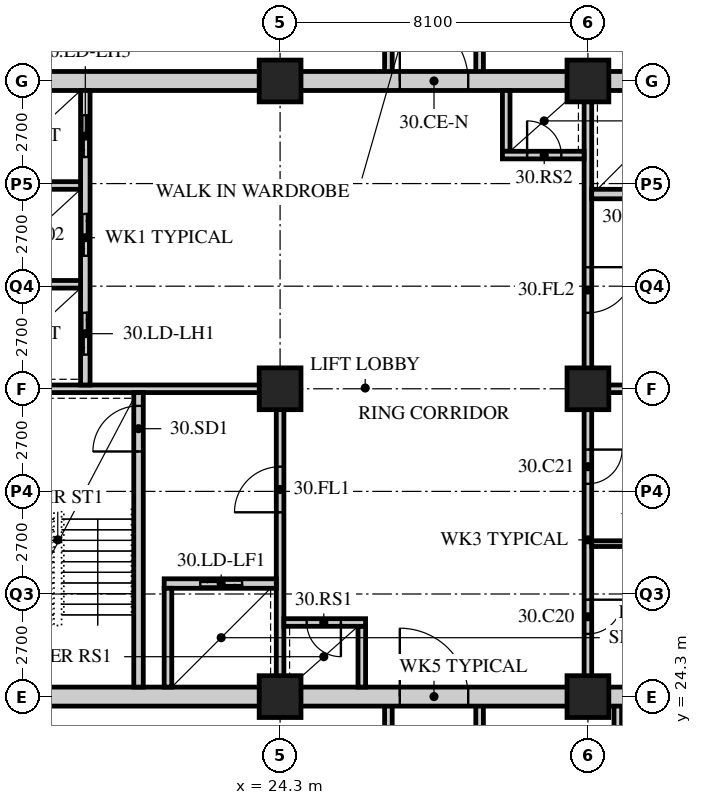
"""IFC4 building model, lengths in metres.
Left out: names, types, materials, properties, quantities, classifications, styles, units other than length and angle.
Written with IfcOpenShell. Run it as: python <this file> out.ifc"""

import sys

from ifc_helpers import new_model, si_unit, direction, frame, frame_2d, origin, origin_2d, place, context, subcontext, project, spatial, rectangle, hollow_rectangle, extrude, element, fill, save


model = new_model("IFC4")
c1 = context("Model", 3, precision=1e-05, world=origin(), true_north=direction((0.0, 1.0)))
c2 = subcontext(c1, "Body", "Model", "MODEL_VIEW")
j1 = project(units=[si_unit("LENGTHUNIT", "METRE"), si_unit("PLANEANGLEUNIT", "RADIAN")], contexts=[c1])
p1 = place(None, origin())
s1 = spatial("IfcSite", under=j1, at=p1, CompositionType="ELEMENT")
p2 = place(p1, origin())
s2 = spatial("IfcBuilding", under=s1, at=p2, CompositionType="ELEMENT")
p3 = place(p2, frame((0.0, 0.0, 120.4)))
s3 = spatial("IfcBuildingStorey", under=s2, at=p3, CompositionType="ELEMENT", Elevation=120.4)
for number, where, z_axis, x_axis in (
    (1, (24.3, 24.3, 0.0), (0.0, 0.0, 1.0), (1.0, 0.0, 0.0)),
    (2, (24.3, 32.4, 0.0), (0.0, 0.0, 1.0), (1.0, 0.0, 0.0)),
    (3, (24.3, 40.5, 0.0), (0.0, 0.0, 1.0), (1.0, 0.0, 0.0)),
    (4, (32.4, 24.3, 0.0), (0.0, 0.0, 1.0), (1.0, 0.0, 0.0)),
    (5, (32.4, 32.4, 0.0), (0.0, 0.0, 1.0), (1.0, 0.0, 0.0)),
    (6, (32.4, 40.5, 0.0), (0.0, 0.0, 1.0), (1.0, 0.0, 0.0)),
):
    element("IfcColumn", number, at=place(p3, frame(where, z_axis=z_axis, x_axis=x_axis)), inside=s3, PredefinedType="COLUMN", context=c2, shape_type="SweptSolid", body=[
        extrude(hollow_rectangle(XDim=1.1, YDim=1.1, WallThickness=0.1, at=origin_2d()), origin(), (0.0, 0.0, 1.0), 3.4),
    ])
for number, where, z_axis, x_axis in (
    (7, (33.186, 19.35, 0.0), (0.0, 0.0, 1.0), (0.0, 1.0, 0.0)),
    (8, (27.15, 19.35, 0.0), (0.0, 0.0, 1.0), (0.0, 1.0, 0.0)),
    (9, (29.55, 19.35, 0.0), (0.0, 0.0, 1.0), (0.0, 1.0, 0.0)),
):
    element("IfcWall", number, at=place(p3, frame(where, z_axis=z_axis, x_axis=x_axis)), inside=s3, PredefinedType="SOLIDWALL", context=c2, shape_type="SweptSolid", body=[
        extrude(rectangle(XDim=4.95, YDim=0.2, at=frame_2d((2.475, 0.0))), origin(), (0.0, 0.0, 1.0), 3.19),
    ])
for number, where, z_axis, x_axis in (
    (10, (27.15, 40.5, 0.0), (0.0, 0.0, 1.0), (0.0, 1.0, 0.0)),
    (11, (29.55, 40.5, 0.0), (0.0, 0.0, 1.0), (0.0, 1.0, 0.0)),
):
    element("IfcWall", number, at=place(p3, frame(where, z_axis=z_axis, x_axis=x_axis)), inside=s3, PredefinedType="SOLIDWALL", context=c2, shape_type="SweptSolid", body=[
        extrude(rectangle(XDim=3.6, YDim=0.2, at=frame_2d((1.8, 0.0))), origin(), (0.0, 0.0, 1.0), 3.19),
    ])
p4 = place(p3, frame((15.95, 24.3, 0.0), z_axis=(0.0, 0.0, 1.0), x_axis=(1.0, 0.0, 0.0)))
e12 = element("IfcWall", 12, at=p4, inside=s3, PredefinedType="SOLIDWALL", context=c2, shape_type="SweptSolid", body=[
    extrude(rectangle(XDim=24.8, YDim=0.5, at=frame_2d((12.4, 0.0))), origin(), (0.0, 0.0, 1.0), 2.54),
])
p5 = place(p4, frame((11.5, 0.0, 0.0)))
e13 = element("IfcOpeningElement", 13, at=p5, cuts=e12, PredefinedType="OPENING", context=c2, shape_type="SweptSolid", body=[
    extrude(rectangle(XDim=1.8, YDim=2.4, at=frame_2d((0.9, 1.2))), frame((0.0, 0.26, 0.0), z_axis=(0.0, -1.0, 0.0), x_axis=(1.0, 0.0, 0.0)), (0.0, 0.0, 1.0), 0.52),
])
p6 = place(p3, frame((15.95, 40.5, 0.0), z_axis=(0.0, 0.0, 1.0), x_axis=(1.0, 0.0, 0.0)))
e14 = element("IfcWall", 14, at=p6, inside=s3, PredefinedType="SOLIDWALL", context=c2, shape_type="SweptSolid", body=[
    extrude(rectangle(XDim=24.8, YDim=0.5, at=frame_2d((12.4, 0.0))), origin(), (0.0, 0.0, 1.0), 2.54),
])
p7 = place(p6, frame((11.5, 0.0, 0.0)))
e15 = element("IfcOpeningElement", 15, at=p7, cuts=e14, PredefinedType="OPENING", context=c2, shape_type="SweptSolid", body=[
    extrude(rectangle(XDim=1.8, YDim=2.4, at=frame_2d((0.9, 1.2))), frame((0.0, 0.26, 0.0), z_axis=(0.0, -1.0, 0.0), x_axis=(1.0, 0.0, 0.0)), (0.0, 0.0, 1.0), 0.52),
])
p8 = place(p3, frame((16.45, 32.4, 0.0), z_axis=(0.0, 0.0, 1.0), x_axis=(1.0, 0.0, 0.0)))
e16 = element("IfcWall", 16, at=p8, inside=s3, PredefinedType="SOLIDWALL", context=c2, shape_type="SweptSolid", body=[
    extrude(rectangle(XDim=7.95, YDim=0.2, at=frame_2d((3.975, 0.0))), origin(), (0.0, 0.0, 1.0), 2.578),
])
p9 = place(p3, frame((24.3, 24.55, 0.0), z_axis=(0.0, 0.0, 1.0), x_axis=(0.0, 1.0, 0.0)))
e17 = element("IfcWall", 17, at=p9, inside=s3, PredefinedType="SOLIDWALL", context=c2, shape_type="SweptSolid", body=[
    extrude(rectangle(XDim=7.75, YDim=0.2, at=frame_2d((3.875, 0.0))), origin(), (0.0, 0.0, 1.0), 2.578),
])
p10 = place(p9, frame((4.6, 0.0, 0.0)))
e18 = element("IfcOpeningElement", 18, at=p10, cuts=e17, PredefinedType="OPENING", context=c2, shape_type="SweptSolid", body=[
    extrude(rectangle(XDim=1.2, YDim=2.1, at=frame_2d((0.6, 1.05))), frame((0.0, 0.11, 0.0), z_axis=(0.0, -1.0, 0.0), x_axis=(1.0, 0.0, 0.0)), (0.0, 0.0, 1.0), 0.22),
])
p11 = place(p3, frame((20.575, 24.55, 0.0), z_axis=(0.0, 0.0, 1.0), x_axis=(0.0, 1.0, 0.0)))
e19 = element("IfcWall", 19, at=p11, inside=s3, PredefinedType="SOLIDWALL", context=c2, shape_type="SweptSolid", body=[
    extrude(rectangle(XDim=7.75, YDim=0.25, at=frame_2d((3.875, 0.0))), origin(), (0.0, 0.0, 1.0), 3.19),
])
p12 = place(p11, frame((6.2, 0.0, 0.0)))
e20 = element("IfcOpeningElement", 20, at=p12, cuts=e19, PredefinedType="OPENING", context=c2, shape_type="SweptSolid", body=[
    extrude(rectangle(XDim=1.2, YDim=2.1, at=frame_2d((0.6, 1.05))), frame((0.0, 0.135, 0.0), z_axis=(0.0, -1.0, 0.0), x_axis=(1.0, 0.0, 0.0)), (0.0, 0.0, 1.0), 0.27),
])
p13 = place(p3, frame((21.25, 27.275, 0.0), z_axis=(0.0, 0.0, 1.0), x_axis=(1.0, 0.0, 0.0)))
e21 = element("IfcWall", 21, at=p13, inside=s3, PredefinedType="SOLIDWALL", context=c2, shape_type="SweptSolid", body=[
    extrude(rectangle(XDim=2.95, YDim=0.25, at=frame_2d((1.475, 0.0))), origin(), (0.0, 0.0, 1.0), 3.19),
])
p14 = place(p13, frame((0.95, 0.0, 0.0)))
e22 = element("IfcOpeningElement", 22, at=p14, cuts=e21, PredefinedType="OPENING", context=c2, shape_type="SweptSolid", body=[
    extrude(rectangle(XDim=1.1, YDim=2.4, at=frame_2d((0.55, 1.2))), frame((0.0, 0.135, 0.0), z_axis=(0.0, -1.0, 0.0), x_axis=(1.0, 0.0, 0.0)), (0.0, 0.0, 1.0), 0.27),
])
p15 = place(p3, frame((21.35, 24.55, 0.0), z_axis=(0.0, 0.0, 1.0), x_axis=(0.0, 1.0, 0.0)))
e23 = element("IfcWall", 23, at=p15, inside=s3, PredefinedType="SOLIDWALL", context=c2, shape_type="SweptSolid", body=[
    extrude(rectangle(XDim=2.6, YDim=0.2, at=frame_2d((1.3, 0.0))), origin(), (0.0, 0.0, 1.0), 3.19),
])
p16 = place(p3, frame((19.175, 32.5, 0.0), z_axis=(0.0, 0.0, 1.0), x_axis=(0.0, 1.0, 0.0)))
e24 = element("IfcWall", 24, at=p16, inside=s3, PredefinedType="SOLIDWALL", context=c2, shape_type="SweptSolid", body=[
    extrude(rectangle(XDim=7.75, YDim=0.25, at=frame_2d((3.875, 0.0))), origin(), (0.0, 0.0, 1.0), 3.19),
])
p17 = place(p16, frame((0.8, 0.0, 0.0)))
e25 = element("IfcOpeningElement", 25, at=p17, cuts=e24, PredefinedType="OPENING", context=c2, shape_type="SweptSolid", body=[
    extrude(rectangle(XDim=1.1, YDim=2.4, at=frame_2d((0.55, 1.2))), frame((0.0, 0.135, 0.0), z_axis=(0.0, -1.0, 0.0), x_axis=(1.0, 0.0, 0.0)), (0.0, 0.0, 1.0), 0.27),
])
p18 = place(p16, frame((3.4, 0.0, 0.0)))
e26 = element("IfcOpeningElement", 26, at=p18, cuts=e24, PredefinedType="OPENING", context=c2, shape_type="SweptSolid", body=[
    extrude(rectangle(XDim=1.1, YDim=2.4, at=frame_2d((0.55, 1.2))), frame((0.0, 0.135, 0.0), z_axis=(0.0, -1.0, 0.0), x_axis=(1.0, 0.0, 0.0)), (0.0, 0.0, 1.0), 0.27),
])
p19 = place(p16, frame((6.0, 0.0, 0.0)))
e27 = element("IfcOpeningElement", 27, at=p19, cuts=e24, PredefinedType="OPENING", context=c2, shape_type="SweptSolid", body=[
    extrude(rectangle(XDim=1.1, YDim=2.4, at=frame_2d((0.55, 1.2))), frame((0.0, 0.135, 0.0), z_axis=(0.0, -1.0, 0.0), x_axis=(1.0, 0.0, 0.0)), (0.0, 0.0, 1.0), 0.27),
])
for number, where, z_axis, x_axis in (
    (28, (16.45, 35.15, 0.0), (0.0, 0.0, 1.0), (1.0, 0.0, 0.0)),
    (29, (16.45, 37.75, 0.0), (0.0, 0.0, 1.0), (1.0, 0.0, 0.0)),
):
    element("IfcWall", number, at=place(p3, frame(where, z_axis=z_axis, x_axis=x_axis)), inside=s3, PredefinedType="SOLIDWALL", context=c2, shape_type="SweptSolid", body=[
        extrude(rectangle(XDim=2.6, YDim=0.2, at=frame_2d((1.3, 0.0))), origin(), (0.0, 0.0, 1.0), 3.19),
    ])
p20 = place(p3, frame((26.45, 24.55, 0.0), z_axis=(0.0, 0.0, 1.0), x_axis=(0.0, 1.0, 0.0)))
e30 = element("IfcWall", 30, at=p20, inside=s3, PredefinedType="SOLIDWALL", context=c2, shape_type="SweptSolid", body=[
    extrude(rectangle(XDim=1.6, YDim=0.2, at=frame_2d((0.8, 0.0))), origin(), (0.0, 0.0, 1.0), 3.19),
])
p21 = place(p3, frame((24.4, 26.25, 0.0), z_axis=(0.0, 0.0, 1.0), x_axis=(1.0, 0.0, 0.0)))
e31 = element("IfcWall", 31, at=p21, inside=s3, PredefinedType="SOLIDWALL", context=c2, shape_type="SweptSolid", body=[
    extrude(rectangle(XDim=2.15, YDim=0.2, at=frame_2d((1.075, 0.0))), origin(), (0.0, 0.0, 1.0), 3.19),
])
p22 = place(p21, frame((0.6, 0.0, 0.0)))
e32 = element("IfcOpeningElement", 32, at=p22, cuts=e31, PredefinedType="OPENING", context=c2, shape_type="SweptSolid", body=[
    extrude(rectangle(XDim=0.9, YDim=2.1, at=frame_2d((0.45, 1.05))), frame((0.0, 0.11, 0.0), z_axis=(0.0, -1.0, 0.0), x_axis=(1.0, 0.0, 0.0)), (0.0, 0.0, 1.0), 0.22),
])
p23 = place(p3, frame((32.3, 32.4, 0.0), z_axis=(0.0, 0.0, 1.0), x_axis=(1.0, 0.0, 0.0)))
e33 = element("IfcWall", 33, at=p23, inside=s3, PredefinedType="SOLIDWALL", context=c2, shape_type="SweptSolid", body=[
    extrude(rectangle(XDim=7.95, YDim=0.2, at=frame_2d((3.975, 0.0))), origin(), (0.0, 0.0, 1.0), 2.578),
])
p24 = place(p3, frame((32.4, 32.5, 0.0), z_axis=(0.0, 0.0, 1.0), x_axis=(0.0, 1.0, 0.0)))
e34 = element("IfcWall", 34, at=p24, inside=s3, PredefinedType="SOLIDWALL", context=c2, shape_type="SweptSolid", body=[
    extrude(rectangle(XDim=7.75, YDim=0.2, at=frame_2d((3.875, 0.0))), origin(), (0.0, 0.0, 1.0), 2.578),
])
p25 = place(p24, frame((1.9, 0.0, 0.0)))
e35 = element("IfcOpeningElement", 35, at=p25, cuts=e34, PredefinedType="OPENING", context=c2, shape_type="SweptSolid", body=[
    extrude(rectangle(XDim=1.2, YDim=2.1, at=frame_2d((0.6, 1.05))), frame((0.0, 0.11, 0.0), z_axis=(0.0, -1.0, 0.0), x_axis=(1.0, 0.0, 0.0)), (0.0, 0.0, 1.0), 0.22),
])
p26 = place(p3, frame((32.5, 37.525, 0.0), z_axis=(0.0, 0.0, 1.0), x_axis=(1.0, 0.0, 0.0)))
e36 = element("IfcWall", 36, at=p26, inside=s3, PredefinedType="SOLIDWALL", context=c2, shape_type="SweptSolid", body=[
    extrude(rectangle(XDim=2.95, YDim=0.25, at=frame_2d((1.475, 0.0))), origin(), (0.0, 0.0, 1.0), 3.19),
])
p27 = place(p26, frame((0.9, 0.0, 0.0)))
e37 = element("IfcOpeningElement", 37, at=p27, cuts=e36, PredefinedType="OPENING", context=c2, shape_type="SweptSolid", body=[
    extrude(rectangle(XDim=1.1, YDim=2.4, at=frame_2d((0.55, 1.2))), frame((0.0, 0.135, 0.0), z_axis=(0.0, -1.0, 0.0), x_axis=(1.0, 0.0, 0.0)), (0.0, 0.0, 1.0), 0.27),
])
p28 = place(p3, frame((30.25, 38.65, 0.0), z_axis=(0.0, 0.0, 1.0), x_axis=(0.0, 1.0, 0.0)))
e38 = element("IfcWall", 38, at=p28, inside=s3, PredefinedType="SOLIDWALL", context=c2, shape_type="SweptSolid", body=[
    extrude(rectangle(XDim=1.6, YDim=0.2, at=frame_2d((0.8, 0.0))), origin(), (0.0, 0.0, 1.0), 3.19),
])
p29 = place(p3, frame((30.15, 38.55, 0.0), z_axis=(0.0, 0.0, 1.0), x_axis=(1.0, 0.0, 0.0)))
e39 = element("IfcWall", 39, at=p29, inside=s3, PredefinedType="SOLIDWALL", context=c2, shape_type="SweptSolid", body=[
    extrude(rectangle(XDim=2.15, YDim=0.2, at=frame_2d((1.075, 0.0))), origin(), (0.0, 0.0, 1.0), 3.19),
])
p30 = place(p29, frame((0.65, 0.0, 0.0)))
e40 = element("IfcOpeningElement", 40, at=p30, cuts=e39, PredefinedType="OPENING", context=c2, shape_type="SweptSolid", body=[
    extrude(rectangle(XDim=0.9, YDim=2.1, at=frame_2d((0.45, 1.05))), frame((0.0, 0.11, 0.0), z_axis=(0.0, -1.0, 0.0), x_axis=(1.0, 0.0, 0.0)), (0.0, 0.0, 1.0), 0.22),
])
p31 = place(p3, frame((32.4, 24.55, 0.0), z_axis=(0.0, 0.0, 1.0), x_axis=(0.0, 1.0, 0.0)))
e41 = element("IfcWall", 41, at=p31, inside=s3, PredefinedType="PARTITIONING", context=c2, shape_type="SweptSolid", body=[
    extrude(rectangle(XDim=7.75, YDim=0.2, at=frame_2d((3.875, 0.0))), origin(), (0.0, 0.0, 1.0), 2.578),
])
p32 = place(p31, frame((1.4, 0.0, 0.0)))
e42 = element("IfcOpeningElement", 42, at=p32, cuts=e41, PredefinedType="OPENING", context=c2, shape_type="SweptSolid", body=[
    extrude(rectangle(XDim=0.9, YDim=2.1, at=frame_2d((0.45, 1.05))), frame((0.0, 0.11, 0.0), z_axis=(0.0, -1.0, 0.0), x_axis=(1.0, 0.0, 0.0)), (0.0, 0.0, 1.0), 0.22),
])
p33 = place(p31, frame((5.35, 0.0, 0.0)))
e43 = element("IfcOpeningElement", 43, at=p33, cuts=e41, PredefinedType="OPENING", context=c2, shape_type="SweptSolid", body=[
    extrude(rectangle(XDim=0.9, YDim=2.1, at=frame_2d((0.45, 1.05))), frame((0.0, 0.11, 0.0), z_axis=(0.0, -1.0, 0.0), x_axis=(1.0, 0.0, 0.0)), (0.0, 0.0, 1.0), 0.22),
])
p34 = place(p3, frame((32.5, 28.325, 0.0), z_axis=(0.0, 0.0, 1.0), x_axis=(1.0, 0.0, 0.0)))
e44 = element("IfcWall", 44, at=p34, inside=s3, PredefinedType="PARTITIONING", context=c2, shape_type="SweptSolid", body=[
    extrude(rectangle(XDim=4.9, YDim=0.15, at=frame_2d((2.45, 0.0))), origin(), (0.0, 0.0, 1.0), 3.19),
])
p35 = place(p32, origin())
e45 = element("IfcDoor", 45, at=p35, inside=s3, OperationType="SINGLE_SWING_LEFT", PredefinedType="DOOR", context=c2, shape_type="SweptSolid", body=[
    extrude(rectangle(XDim=0.9, YDim=2.1, at=frame_2d((0.45, 1.05))), frame((0.0, 0.025, 0.0), z_axis=(0.0, -1.0, 0.0), x_axis=(1.0, 0.0, 0.0)), (0.0, 0.0, 1.0), 0.05),
])
fill(e42, e45)
p36 = place(p33, origin())
e46 = element("IfcDoor", 46, at=p36, inside=s3, OperationType="SINGLE_SWING_LEFT", PredefinedType="DOOR", context=c2, shape_type="SweptSolid", body=[
    extrude(rectangle(XDim=0.9, YDim=2.1, at=frame_2d((0.45, 1.05))), frame((0.0, 0.025, 0.0), z_axis=(0.0, -1.0, 0.0), x_axis=(1.0, 0.0, 0.0)), (0.0, 0.0, 1.0), 0.05),
])
fill(e43, e46)
p37 = place(p12, origin())
e47 = element("IfcDoor", 47, at=p37, inside=s3, OperationType="SINGLE_SWING_LEFT", PredefinedType="DOOR", context=c2, shape_type="SweptSolid", body=[
    extrude(rectangle(XDim=1.2, YDim=2.1, at=frame_2d((0.6, 1.05))), frame((0.0, 0.025, 0.0), z_axis=(0.0, -1.0, 0.0), x_axis=(1.0, 0.0, 0.0)), (0.0, 0.0, 1.0), 0.05),
])
fill(e20, e47)
p38 = place(p10, origin())
e48 = element("IfcDoor", 48, at=p38, inside=s3, OperationType="SINGLE_SWING_LEFT", PredefinedType="DOOR", context=c2, shape_type="SweptSolid", body=[
    extrude(rectangle(XDim=1.2, YDim=2.1, at=frame_2d((0.6, 1.05))), frame((0.0, 0.025, 0.0), z_axis=(0.0, -1.0, 0.0), x_axis=(1.0, 0.0, 0.0)), (0.0, 0.0, 1.0), 0.05),
])
fill(e18, e48)
p39 = place(p22, origin())
e49 = element("IfcDoor", 49, at=p39, inside=s3, OperationType="SINGLE_SWING_LEFT", PredefinedType="DOOR", context=c2, shape_type="SweptSolid", body=[
    extrude(rectangle(XDim=0.9, YDim=2.1, at=frame_2d((0.45, 1.05))), frame((0.0, 0.025, 0.0), z_axis=(0.0, -1.0, 0.0), x_axis=(1.0, 0.0, 0.0)), (0.0, 0.0, 1.0), 0.05),
])
fill(e32, e49)
p40 = place(p25, origin())
e50 = element("IfcDoor", 50, at=p40, inside=s3, OperationType="SINGLE_SWING_LEFT", PredefinedType="DOOR", context=c2, shape_type="SweptSolid", body=[
    extrude(rectangle(XDim=1.2, YDim=2.1, at=frame_2d((0.6, 1.05))), frame((0.0, 0.025, 0.0), z_axis=(0.0, -1.0, 0.0), x_axis=(1.0, 0.0, 0.0)), (0.0, 0.0, 1.0), 0.05),
])
fill(e35, e50)
p41 = place(p30, origin())
e51 = element("IfcDoor", 51, at=p41, inside=s3, OperationType="SINGLE_SWING_LEFT", PredefinedType="DOOR", context=c2, shape_type="SweptSolid", body=[
    extrude(rectangle(XDim=0.9, YDim=2.1, at=frame_2d((0.45, 1.05))), frame((0.0, 0.025, 0.0), z_axis=(0.0, -1.0, 0.0), x_axis=(1.0, 0.0, 0.0)), (0.0, 0.0, 1.0), 0.05),
])
fill(e40, e51)
p42 = place(p17, origin())
e52 = element("IfcDoor", 52, at=p42, inside=s3, OperationType="DOUBLE_DOOR_SLIDING", PredefinedType="DOOR", context=c2, shape_type="SweptSolid", body=[
    extrude(rectangle(XDim=1.1, YDim=2.4, at=frame_2d((0.55, 1.2))), frame((0.0, 0.025, 0.0), z_axis=(0.0, -1.0, 0.0), x_axis=(1.0, 0.0, 0.0)), (0.0, 0.0, 1.0), 0.05),
])
fill(e25, e52)
p43 = place(p18, origin())
e53 = element("IfcDoor", 53, at=p43, inside=s3, OperationType="DOUBLE_DOOR_SLIDING", PredefinedType="DOOR", context=c2, shape_type="SweptSolid", body=[
    extrude(rectangle(XDim=1.1, YDim=2.4, at=frame_2d((0.55, 1.2))), frame((0.0, 0.025, 0.0), z_axis=(0.0, -1.0, 0.0), x_axis=(1.0, 0.0, 0.0)), (0.0, 0.0, 1.0), 0.05),
])
fill(e26, e53)
p44 = place(p19, origin())
e54 = element("IfcDoor", 54, at=p44, inside=s3, OperationType="DOUBLE_DOOR_SLIDING", PredefinedType="DOOR", context=c2, shape_type="SweptSolid", body=[
    extrude(rectangle(XDim=1.1, YDim=2.4, at=frame_2d((0.55, 1.2))), frame((0.0, 0.025, 0.0), z_axis=(0.0, -1.0, 0.0), x_axis=(1.0, 0.0, 0.0)), (0.0, 0.0, 1.0), 0.05),
])
fill(e27, e54)
p45 = place(p14, origin())
e55 = element("IfcDoor", 55, at=p45, inside=s3, OperationType="DOUBLE_DOOR_SLIDING", PredefinedType="DOOR", context=c2, shape_type="SweptSolid", body=[
    extrude(rectangle(XDim=1.1, YDim=2.4, at=frame_2d((0.55, 1.2))), frame((0.0, 0.025, 0.0), z_axis=(0.0, -1.0, 0.0), x_axis=(1.0, 0.0, 0.0)), (0.0, 0.0, 1.0), 0.05),
])
fill(e22, e55)
p46 = place(p5, origin())
e56 = element("IfcDoor", 56, at=p46, inside=s3, OperationType="DOUBLE_DOOR_SINGLE_SWING", PredefinedType="DOOR", context=c2, shape_type="SweptSolid", body=[
    extrude(rectangle(XDim=1.8, YDim=2.4, at=frame_2d((0.9, 1.2))), frame((0.0, 0.025, 0.0), z_axis=(0.0, -1.0, 0.0), x_axis=(1.0, 0.0, 0.0)), (0.0, 0.0, 1.0), 0.05),
])
fill(e13, e56)
p47 = place(p7, origin())
e57 = element("IfcDoor", 57, at=p47, inside=s3, OperationType="DOUBLE_DOOR_SINGLE_SWING", PredefinedType="DOOR", context=c2, shape_type="SweptSolid", body=[
    extrude(rectangle(XDim=1.8, YDim=2.4, at=frame_2d((0.9, 1.2))), frame((0.0, 0.025, 0.0), z_axis=(0.0, -1.0, 0.0), x_axis=(1.0, 0.0, 0.0)), (0.0, 0.0, 1.0), 0.05),
])
fill(e15, e57)
save(model, sys.argv[1])
